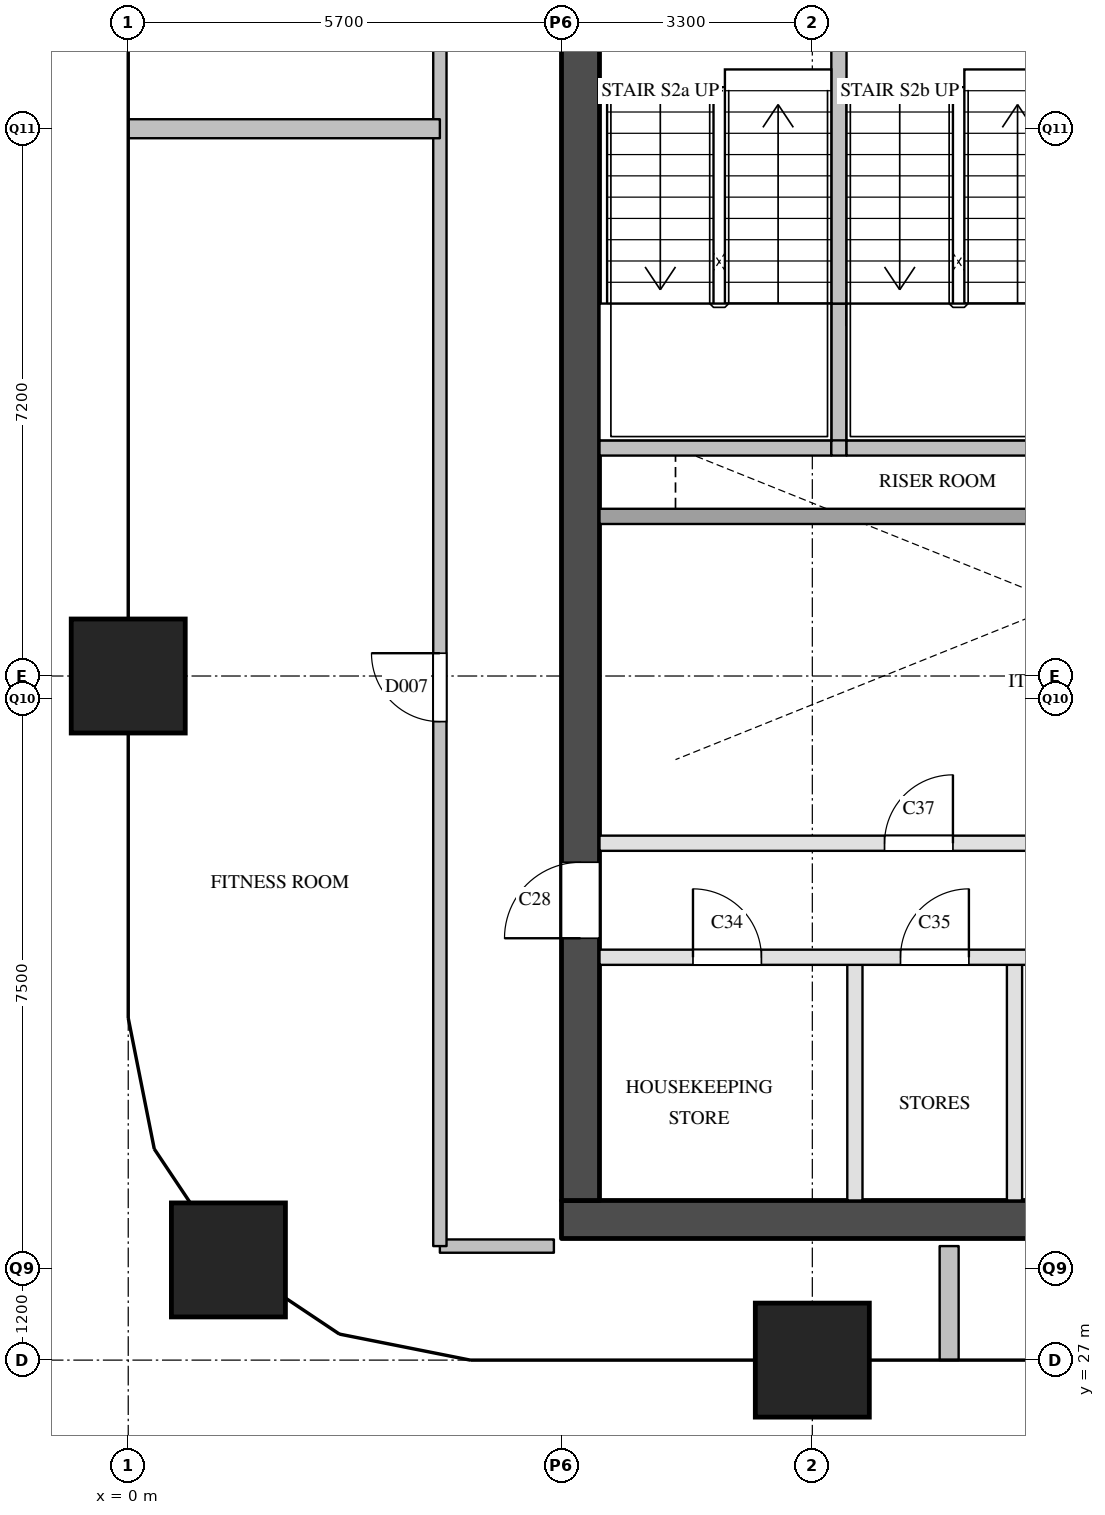
"""IFC4 building model, lengths in metres.
Left out: names, types, materials, properties, quantities, classifications, styles, units other than length and angle.
Written with IfcOpenShell. Run it as: python <this file> out.ifc"""

import sys

from ifc_helpers import new_model, si_unit, direction, frame, frame_2d, origin, origin_2d, place, context, subcontext, project, spatial, rectangle, extrude, element, fill, save


model = new_model("IFC4")
c1 = context("Model", 3, precision=1e-05, world=origin(), true_north=direction((0.0, 1.0)))
c2 = subcontext(c1, "Body", "Model", "MODEL_VIEW")
j1 = project(units=[si_unit("LENGTHUNIT", "METRE"), si_unit("PLANEANGLEUNIT", "RADIAN")], contexts=[c1])
p1 = place(None, origin())
s1 = spatial("IfcSite", under=j1, at=p1, CompositionType="ELEMENT")
p2 = place(p1, origin())
s2 = spatial("IfcBuilding", under=s1, at=p2, CompositionType="ELEMENT")
p3 = place(p2, frame((0.0, 0.0, 162.2)))
s3 = spatial("IfcBuildingStorey", under=s2, at=p3, CompositionType="ELEMENT", Elevation=162.2)
for number, where, z_axis, x_axis in (
    (1, (1.318, 28.318, 0.0), (0.0, 0.0, 1.0), (1.0, 0.0, 0.0)),
    (2, (0.0, 36.0, 0.0), (0.0, 0.0, 1.0), (1.0, 0.0, 0.0)),
    (3, (9.0, 27.0, 0.0), (0.0, 0.0, 1.0), (1.0, 0.0, 0.0)),
):
    element("IfcColumn", number, at=place(p3, frame(where, z_axis=z_axis, x_axis=x_axis)), inside=s3, PredefinedType="COLUMN", context=c2, shape_type="SweptSolid", body=[
        extrude(rectangle(XDim=1.5, YDim=1.5, at=origin_2d()), origin(), (0.0, 0.0, 1.0), 3.9),
    ])
p4 = place(p3, frame((5.7, 28.85, 0.0), z_axis=(0.0, 0.0, 1.0), x_axis=(1.0, 0.0, 0.0)))
e4 = element("IfcWall", 4, at=p4, inside=s3, PredefinedType="SHEAR", context=c2, shape_type="SweptSolid", body=[
    extrude(rectangle(XDim=12.2, YDim=0.5, at=frame_2d((6.1, 0.0))), origin(), (0.0, 0.0, 1.0), 3.6),
])
p5 = place(p4, frame((9.35, 0.0, 0.0)))
e5 = element("IfcOpeningElement", 5, at=p5, cuts=e4, PredefinedType="OPENING", context=c2, shape_type="SweptSolid", body=[
    extrude(rectangle(XDim=1.2, YDim=2.1, at=frame_2d((0.6, 1.05))), frame((0.0, 0.26, 0.0), z_axis=(0.0, -1.0, 0.0), x_axis=(1.0, 0.0, 0.0)), (0.0, 0.0, 1.0), 0.52),
])
p6 = place(p3, frame((5.95, 29.1, 0.0), z_axis=(0.0, 0.0, 1.0), x_axis=(0.0, 1.0, 0.0)))
e6 = element("IfcWall", 6, at=p6, inside=s3, PredefinedType="SHEAR", context=c2, shape_type="SweptSolid", body=[
    extrude(rectangle(XDim=20.3, YDim=0.5, at=frame_2d((10.15, 0.0))), origin(), (0.0, 0.0, 1.0), 3.6),
])
p7 = place(p6, frame((3.45, 0.0, 0.0)))
e7 = element("IfcOpeningElement", 7, at=p7, cuts=e6, PredefinedType="OPENING", context=c2, shape_type="SweptSolid", body=[
    extrude(rectangle(XDim=1.0, YDim=2.1, at=frame_2d((0.5, 1.05))), frame((0.0, 0.26, 0.0), z_axis=(0.0, -1.0, 0.0), x_axis=(1.0, 0.0, 0.0)), (0.0, 0.0, 1.0), 0.52),
])
p8 = place(p6, frame((16.4, 0.0, 0.0)))
e8 = element("IfcOpeningElement", 8, at=p8, cuts=e6, PredefinedType="OPENING", context=c2, shape_type="SweptSolid", body=[
    extrude(rectangle(XDim=1.0, YDim=2.1, at=frame_2d((0.5, 1.05))), frame((0.0, 0.26, 0.0), z_axis=(0.0, -1.0, 0.0), x_axis=(1.0, 0.0, 0.0)), (0.0, 0.0, 1.0), 0.52),
])
p9 = place(p3, frame((9.35, 39.0, 0.0), z_axis=(0.0, 0.0, 1.0), x_axis=(0.0, 1.0, 0.0)))
e9 = element("IfcWall", 9, at=p9, inside=s3, PredefinedType="SOLIDWALL", context=c2, shape_type="SweptSolid", body=[
    extrude(rectangle(XDim=1.9, YDim=0.2, at=frame_2d((0.95, 0.0))), origin(), (0.0, 0.0, 1.0), 3.6),
])
p10 = place(p3, frame((9.35, 40.9, 0.0), z_axis=(0.0, 0.0, 1.0), x_axis=(0.0, 1.0, 0.0)))
e10 = element("IfcWall", 10, at=p10, inside=s3, PredefinedType="SOLIDWALL", context=c2, shape_type="SweptSolid", body=[
    extrude(rectangle(XDim=4.3, YDim=0.2, at=frame_2d((2.15, 0.0))), origin(), (0.0, 0.0, 1.0), 3.6),
])
for number, where, z_axis, x_axis in (
    (11, (9.56, 29.1, 0.0), (0.0, 0.0, 1.0), (0.0, 1.0, 0.0)),
    (12, (11.66, 29.1, 0.0), (0.0, 0.0, 1.0), (0.0, 1.0, 0.0)),
):
    element("IfcWall", number, at=place(p3, frame(where, z_axis=z_axis, x_axis=x_axis)), inside=s3, PredefinedType="PARTITIONING", context=c2, shape_type="SweptSolid", body=[
        extrude(rectangle(XDim=3.2, YDim=0.2, at=frame_2d((1.6, 0.0))), origin(), (0.0, 0.0, 1.0), 3.6),
    ])
p11 = place(p3, frame((6.2, 32.3, 0.0), z_axis=(0.0, 0.0, 1.0), x_axis=(1.0, 0.0, 0.0)))
e13 = element("IfcWall", 13, at=p11, inside=s3, PredefinedType="PARTITIONING", context=c2, shape_type="SweptSolid", body=[
    extrude(rectangle(XDim=8.4, YDim=0.2, at=frame_2d((4.2, 0.0))), origin(), (0.0, 0.0, 1.0), 3.6),
])
p12 = place(p11, frame((1.23, 0.0, 0.0)))
e14 = element("IfcOpeningElement", 14, at=p12, cuts=e13, PredefinedType="OPENING", context=c2, shape_type="SweptSolid", body=[
    extrude(rectangle(XDim=0.9, YDim=2.1, at=frame_2d((0.45, 1.05))), frame((0.0, 0.11, 0.0), z_axis=(0.0, -1.0, 0.0), x_axis=(1.0, 0.0, 0.0)), (0.0, 0.0, 1.0), 0.22),
])
p13 = place(p11, frame((3.96, 0.0, 0.0)))
e15 = element("IfcOpeningElement", 15, at=p13, cuts=e13, PredefinedType="OPENING", context=c2, shape_type="SweptSolid", body=[
    extrude(rectangle(XDim=0.9, YDim=2.1, at=frame_2d((0.45, 1.05))), frame((0.0, 0.11, 0.0), z_axis=(0.0, -1.0, 0.0), x_axis=(1.0, 0.0, 0.0)), (0.0, 0.0, 1.0), 0.22),
])
p14 = place(p11, frame((6.48, 0.0, 0.0)))
e16 = element("IfcOpeningElement", 16, at=p14, cuts=e13, PredefinedType="OPENING", context=c2, shape_type="SweptSolid", body=[
    extrude(rectangle(XDim=0.9, YDim=2.1, at=frame_2d((0.45, 1.05))), frame((0.0, 0.11, 0.0), z_axis=(0.0, -1.0, 0.0), x_axis=(1.0, 0.0, 0.0)), (0.0, 0.0, 1.0), 0.22),
])
p15 = place(p3, frame((6.2, 33.8, 0.0), z_axis=(0.0, 0.0, 1.0), x_axis=(1.0, 0.0, 0.0)))
e17 = element("IfcWall", 17, at=p15, inside=s3, PredefinedType="PARTITIONING", context=c2, shape_type="SweptSolid", body=[
    extrude(rectangle(XDim=8.4, YDim=0.2, at=frame_2d((4.2, 0.0))), origin(), (0.0, 0.0, 1.0), 3.6),
])
p16 = place(p15, frame((3.75, 0.0, 0.0)))
e18 = element("IfcOpeningElement", 18, at=p16, cuts=e17, PredefinedType="OPENING", context=c2, shape_type="SweptSolid", body=[
    extrude(rectangle(XDim=0.9, YDim=2.1, at=frame_2d((0.45, 1.05))), frame((0.0, 0.11, 0.0), z_axis=(0.0, -1.0, 0.0), x_axis=(1.0, 0.0, 0.0)), (0.0, 0.0, 1.0), 0.22),
])
p17 = place(p3, frame((6.2, 38.1, 0.0), z_axis=(0.0, 0.0, 1.0), x_axis=(1.0, 0.0, 0.0)))
e19 = element("IfcWall", 19, at=p17, inside=s3, PredefinedType="SOLIDWALL", context=c2, shape_type="SweptSolid", body=[
    extrude(rectangle(XDim=11.2, YDim=0.2, at=frame_2d((5.6, 0.0))), origin(), (0.0, 0.0, 1.0), 3.6),
])
p18 = place(p17, frame((8.85, 0.0, 0.0)))
e20 = element("IfcOpeningElement", 20, at=p18, cuts=e19, PredefinedType="OPENING", context=c2, shape_type="SweptSolid", body=[
    extrude(rectangle(XDim=1.2, YDim=2.1, at=frame_2d((0.6, 1.05))), frame((0.0, 0.11, 0.0), z_axis=(0.0, -1.0, 0.0), x_axis=(1.0, 0.0, 0.0)), (0.0, 0.0, 1.0), 0.22),
])
p19 = place(p3, frame((6.2, 39.0, 0.0), z_axis=(0.0, 0.0, 1.0), x_axis=(1.0, 0.0, 0.0)))
e21 = element("IfcWall", 21, at=p19, inside=s3, PredefinedType="SOLIDWALL", context=c2, shape_type="SweptSolid", body=[
    extrude(rectangle(XDim=3.05, YDim=0.2, at=frame_2d((1.525, 0.0))), origin(), (0.0, 0.0, 1.0), 3.6),
])
p20 = place(p3, frame((9.25, 39.0, 0.0), z_axis=(0.0, 0.0, 1.0), x_axis=(1.0, 0.0, 0.0)))
e22 = element("IfcWall", 22, at=p20, inside=s3, PredefinedType="SOLIDWALL", context=c2, shape_type="SweptSolid", body=[
    extrude(rectangle(XDim=0.2, YDim=0.2, at=frame_2d((0.1, 0.0))), origin(), (0.0, 0.0, 1.0), 3.6),
])
p21 = place(p3, frame((9.45, 39.0, 0.0), z_axis=(0.0, 0.0, 1.0), x_axis=(1.0, 0.0, 0.0)))
e23 = element("IfcWall", 23, at=p21, inside=s3, PredefinedType="SOLIDWALL", context=c2, shape_type="SweptSolid", body=[
    extrude(rectangle(XDim=3.05, YDim=0.2, at=frame_2d((1.525, 0.0))), origin(), (0.0, 0.0, 1.0), 3.6),
])
p22 = place(p3, frame((4.1, 28.5, 0.0), z_axis=(0.0, 0.0, 1.0), x_axis=(1.0, 0.0, 0.0)))
e24 = element("IfcWall", 24, at=p22, inside=s3, PredefinedType="PARTITIONING", context=c2, shape_type="SweptSolid", body=[
    extrude(rectangle(XDim=1.5, YDim=0.175, at=frame_2d((0.75, 0.0))), origin(), (0.0, 0.0, 1.0), 3.6),
])
p23 = place(p3, frame((4.1, 28.5, 0.0), z_axis=(0.0, 0.0, 1.0), x_axis=(0.0, 1.0, 0.0)))
e25 = element("IfcWall", 25, at=p23, inside=s3, PredefinedType="PARTITIONING", context=c2, shape_type="SweptSolid", body=[
    extrude(rectangle(XDim=23.0, YDim=0.175, at=frame_2d((11.5, 0.0))), origin(), (0.0, 0.0, 1.0), 3.6),
])
p24 = place(p23, frame((6.9, 0.0, 0.0)))
e26 = element("IfcOpeningElement", 26, at=p24, cuts=e25, PredefinedType="OPENING", context=c2, shape_type="SweptSolid", body=[
    extrude(rectangle(XDim=0.9, YDim=2.1, at=frame_2d((0.45, 1.05))), frame((0.0, 0.097, 0.0), z_axis=(0.0, -1.0, 0.0), x_axis=(1.0, 0.0, 0.0)), (0.0, 0.0, 1.0), 0.195),
])
p25 = place(p23, frame((18.4, 0.0, 0.0)))
e27 = element("IfcOpeningElement", 27, at=p25, cuts=e25, PredefinedType="OPENING", context=c2, shape_type="SweptSolid", body=[
    extrude(rectangle(XDim=0.9, YDim=2.1, at=frame_2d((0.45, 1.05))), frame((0.0, 0.097, 0.0), z_axis=(0.0, -1.0, 0.0), x_axis=(1.0, 0.0, 0.0)), (0.0, 0.0, 1.0), 0.195),
])
p26 = place(p3, frame((0.0, 43.2, 0.0), z_axis=(0.0, 0.0, 1.0), x_axis=(1.0, 0.0, 0.0)))
e28 = element("IfcWall", 28, at=p26, inside=s3, PredefinedType="PARTITIONING", context=c2, shape_type="SweptSolid", body=[
    extrude(rectangle(XDim=4.1, YDim=0.25, at=frame_2d((2.05, 0.0))), origin(), (0.0, 0.0, 1.0), 2.6),
])
p27 = place(p3, frame((10.8, 27.0, 0.0), z_axis=(0.0, 0.0, 1.0), x_axis=(0.0, 1.0, 0.0)))
e29 = element("IfcWall", 29, at=p27, inside=s3, PredefinedType="PARTITIONING", context=c2, shape_type="SweptSolid", body=[
    extrude(rectangle(XDim=1.5, YDim=0.25, at=frame_2d((0.75, 0.0))), origin(), (0.0, 0.0, 1.0), 2.6),
])
p28 = place(p7, origin())
e30 = element("IfcDoor", 30, at=p28, inside=s3, OperationType="SINGLE_SWING_LEFT", PredefinedType="DOOR", context=c2, shape_type="SweptSolid", body=[
    extrude(rectangle(XDim=1.0, YDim=2.1, at=frame_2d((0.5, 1.05))), frame((0.0, 0.025, 0.0), z_axis=(0.0, -1.0, 0.0), x_axis=(1.0, 0.0, 0.0)), (0.0, 0.0, 1.0), 0.05),
])
fill(e7, e30)
p29 = place(p12, origin())
e31 = element("IfcDoor", 31, at=p29, inside=s3, OperationType="SINGLE_SWING_LEFT", PredefinedType="DOOR", context=c2, shape_type="SweptSolid", body=[
    extrude(rectangle(XDim=0.9, YDim=2.1, at=frame_2d((0.45, 1.05))), frame((0.0, 0.025, 0.0), z_axis=(0.0, -1.0, 0.0), x_axis=(1.0, 0.0, 0.0)), (0.0, 0.0, 1.0), 0.05),
])
fill(e14, e31)
p30 = place(p13, origin())
e32 = element("IfcDoor", 32, at=p30, inside=s3, OperationType="SINGLE_SWING_RIGHT", PredefinedType="DOOR", context=c2, shape_type="SweptSolid", body=[
    extrude(rectangle(XDim=0.9, YDim=2.1, at=frame_2d((0.45, 1.05))), frame((0.0, 0.025, 0.0), z_axis=(0.0, -1.0, 0.0), x_axis=(1.0, 0.0, 0.0)), (0.0, 0.0, 1.0), 0.05),
])
fill(e15, e32)
p31 = place(p16, origin())
e33 = element("IfcDoor", 33, at=p31, inside=s3, OperationType="SINGLE_SWING_RIGHT", PredefinedType="DOOR", context=c2, shape_type="SweptSolid", body=[
    extrude(rectangle(XDim=0.9, YDim=2.1, at=frame_2d((0.45, 1.05))), frame((0.0, 0.025, 0.0), z_axis=(0.0, -1.0, 0.0), x_axis=(1.0, 0.0, 0.0)), (0.0, 0.0, 1.0), 0.05),
])
fill(e18, e33)
p32 = place(p24, origin())
e34 = element("IfcDoor", 34, at=p32, inside=s3, OperationType="SINGLE_SWING_RIGHT", PredefinedType="DOOR", context=c2, shape_type="SweptSolid", body=[
    extrude(rectangle(XDim=0.9, YDim=2.1, at=frame_2d((0.45, 1.05))), frame((0.0, 0.025, 0.0), z_axis=(0.0, -1.0, 0.0), x_axis=(1.0, 0.0, 0.0)), (0.0, 0.0, 1.0), 0.05),
])
fill(e26, e34)
save(model, sys.argv[1])
